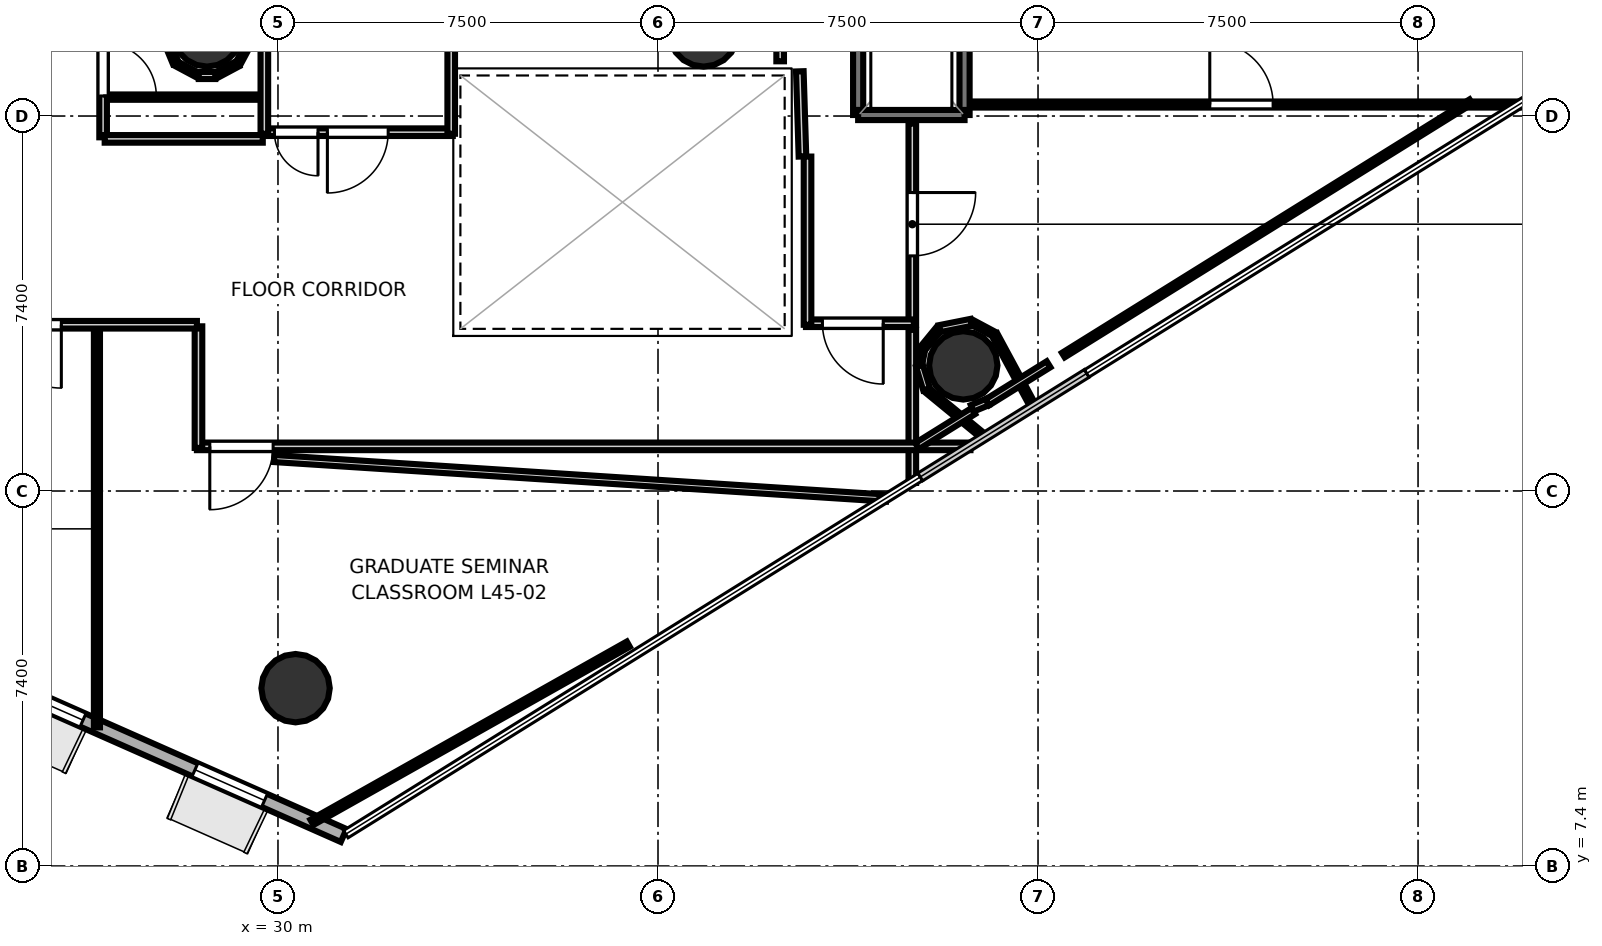
"""IFC4 building model, lengths in metres.
Left out: names, types, materials, properties, quantities, classifications, styles, units other than length and angle.
Written with IfcOpenShell. Run it as: python <this file> out.ifc"""

import sys

from ifc_helpers import new_model, si_unit, direction, frame, frame_2d, origin, origin_2d, place, context, subcontext, project, spatial, rectangle, hollow_circle, extrude, element, fill, save


model = new_model("IFC4")
c1 = context("Model", 3, precision=1e-05, world=origin(), true_north=direction((0.0, 1.0)))
c2 = subcontext(c1, "Body", "Model", "MODEL_VIEW")
j1 = project(units=[si_unit("LENGTHUNIT", "METRE"), si_unit("PLANEANGLEUNIT", "RADIAN")], contexts=[c1])
p1 = place(None, origin())
s1 = spatial("IfcSite", under=j1, at=p1, CompositionType="ELEMENT")
p2 = place(p1, origin())
s2 = spatial("IfcBuilding", under=s1, at=p2, CompositionType="ELEMENT")
p3 = place(p2, frame((0.0, 0.0, 177.2)))
s3 = spatial("IfcBuildingStorey", under=s2, at=p3, CompositionType="ELEMENT", Elevation=177.2)
for number, where, z_axis, x_axis in (
    (1, (28.6, 23.85, 0.0), (0.0, 0.0, 1.0), (1.0, 0.0, 0.0)),
    (2, (38.4, 23.85, 0.0), (0.0, 0.0, 1.0), (1.0, 0.0, 0.0)),
    (3, (30.347, 10.909, 0.0), (0.0, 0.0, 1.0), (1.0, 0.0, 0.0)),
    (4, (43.525, 17.279, 0.0), (0.0, 0.0, 1.0), (1.0, 0.0, 0.0)),
):
    element("IfcColumn", number, at=place(p3, frame(where, z_axis=z_axis, x_axis=x_axis)), inside=s3, PredefinedType="COLUMN", context=c2, shape_type="SweptSolid", body=[
        extrude(hollow_circle(Radius=0.675, WallThickness=0.032, at=origin_2d()), origin(), (0.0, 0.0, 1.0), 3.7),
    ])
p4 = place(p3, frame((23.803, 11.317, 0.0), z_axis=(0.0, 0.0, 1.0), x_axis=(0.914484878605, -0.404620077112, 0.0)))
e5 = element("IfcWall", 5, at=p4, inside=s3, PredefinedType="SOLIDWALL", context=c2, shape_type="SweptSolid", body=[
    extrude(rectangle(XDim=8.193, YDim=0.28, at=frame_2d((4.097, 0.0))), origin(), (0.0, 0.0, 1.0), 3.52),
])
p5 = place(p4, frame((1.068, 0.0, 0.85)))
e6 = element("IfcOpeningElement", 6, at=p5, cuts=e5, PredefinedType="OPENING", context=c2, shape_type="SweptSolid", body=[
    extrude(rectangle(XDim=1.5, YDim=2.1, at=frame_2d((0.75, 1.05))), frame((0.0, 0.15, 0.0), z_axis=(0.0, -1.0, 0.0), x_axis=(1.0, 0.0, 0.0)), (0.0, 0.0, 1.0), 0.3),
])
p6 = place(p4, frame((4.985, 0.0, 0.85)))
e7 = element("IfcOpeningElement", 7, at=p6, cuts=e5, PredefinedType="OPENING", context=c2, shape_type="SweptSolid", body=[
    extrude(rectangle(XDim=1.5, YDim=2.1, at=frame_2d((0.75, 1.05))), frame((0.0, 0.15, 0.0), z_axis=(0.0, -1.0, 0.0), x_axis=(1.0, 0.0, 0.0)), (0.0, 0.0, 1.0), 0.3),
])
for number, where, z_axis, x_axis in (
    (8, (43.55, 22.22, 0.0), (0.0, 0.0, 1.0), (0.0, 1.0, 0.0)),
    (9, (41.45, 22.22, 0.0), (0.0, 0.0, 1.0), (0.0, 1.0, 0.0)),
):
    element("IfcWall", number, at=place(p3, frame(where, z_axis=z_axis, x_axis=x_axis)), inside=s3, PredefinedType="SOLIDWALL", context=c2, shape_type="SweptSolid", body=[
        extrude(rectangle(XDim=2.36, YDim=0.2, at=frame_2d((1.18, 0.0))), origin(), (0.0, 0.0, 1.0), 3.52),
    ])
p7 = place(p3, frame((41.45, 22.22, 0.0), z_axis=(0.0, 0.0, 1.0), x_axis=(1.0, 0.0, 0.0)))
e10 = element("IfcWall", 10, at=p7, inside=s3, PredefinedType="SOLIDWALL", context=c2, shape_type="SweptSolid", body=[
    extrude(rectangle(XDim=2.1, YDim=0.2, at=frame_2d((1.05, 0.0))), origin(), (0.0, 0.0, 1.0), 3.52),
])
p8 = place(p3, frame((33.45, 21.881, 0.0), z_axis=(0.0, 0.0, 1.0), x_axis=(-1.0, 0.0, 0.0)))
e11 = element("IfcWall", 11, at=p8, inside=s3, PredefinedType="PARTITIONING", context=c2, shape_type="SweptSolid", body=[
    extrude(rectangle(XDim=3.75, YDim=0.15, at=frame_2d((1.875, 0.0))), origin(), (0.0, 0.0, 1.0), 2.84),
])
p9 = place(p8, frame((1.275, 0.0, 0.0)))
e12 = element("IfcOpeningElement", 12, at=p9, cuts=e11, PredefinedType="OPENING", context=c2, shape_type="SweptSolid", body=[
    extrude(rectangle(XDim=1.2, YDim=2.15, at=frame_2d((0.6, 1.075))), frame((0.0, 0.085, 0.0), z_axis=(0.0, -1.0, 0.0), x_axis=(1.0, 0.0, 0.0)), (0.0, 0.0, 1.0), 0.17),
])
p10 = place(p8, frame((2.66, 0.0, 0.0)))
e13 = element("IfcOpeningElement", 13, at=p10, cuts=e11, PredefinedType="OPENING", context=c2, shape_type="SweptSolid", body=[
    extrude(rectangle(XDim=0.86, YDim=2.05, at=frame_2d((0.43, 1.025))), frame((0.0, 0.085, 0.0), z_axis=(0.0, -1.0, 0.0), x_axis=(1.0, 0.0, 0.0)), (0.0, 0.0, 1.0), 0.17),
])
for number, where, z_axis, x_axis in (
    (14, (29.731, 21.85, 0.0), (0.0, 0.0, 1.0), (0.0, 1.0, 0.0)),
    (15, (33.419, 24.442, 0.0), (0.0, 0.0, 1.0), (0.0, -1.0, 0.0)),
):
    element("IfcWall", number, at=place(p3, frame(where, z_axis=z_axis, x_axis=x_axis)), inside=s3, PredefinedType="PARTITIONING", context=c2, shape_type="SweptSolid", body=[
        extrude(rectangle(XDim=2.592, YDim=0.15, at=frame_2d((1.296, 0.0))), origin(), (0.0, 0.0, 1.0), 2.84),
    ])
p11 = place(p3, frame((40.351, 21.401, 0.0), z_axis=(0.0, 0.0, 1.0), x_axis=(-0.031058045979, 0.999517582527, 0.0)))
e16 = element("IfcWall", 16, at=p11, inside=s3, PredefinedType="PARTITIONING", context=c2, shape_type="SweptSolid", body=[
    extrude(rectangle(XDim=1.682, YDim=0.15, at=frame_2d((0.841, 0.0))), origin(), (0.0, 0.0, 1.0), 2.84),
])
p12 = place(p3, frame((39.911, 23.28, 0.0), z_axis=(0.0, 0.0, 1.0), x_axis=(0.0, 1.0, 0.0)))
e17 = element("IfcWall", 17, at=p12, inside=s3, PredefinedType="PARTITIONING", context=c2, shape_type="SweptSolid", body=[
    extrude(rectangle(XDim=1.48, YDim=0.15, at=frame_2d((0.74, 0.0))), origin(), (0.0, 0.0, 1.0), 2.84),
])
p13 = place(p3, frame((42.519, 22.05, 0.0), z_axis=(0.0, 0.0, 1.0), x_axis=(0.0, -1.0, 0.0)))
e18 = element("IfcWall", 18, at=p13, inside=s3, PredefinedType="PARTITIONING", context=c2, shape_type="SweptSolid", body=[
    extrude(rectangle(XDim=3.97, YDim=0.15, at=frame_2d((1.985, 0.0))), origin(), (0.0, 0.0, 1.0), 2.84),
])
p14 = place(p13, frame((1.36, 0.0, 0.0)))
e19 = element("IfcOpeningElement", 19, at=p14, cuts=e18, PredefinedType="OPENING", context=c2, shape_type="SweptSolid", body=[
    extrude(rectangle(XDim=1.25, YDim=2.2, at=frame_2d((0.625, 1.1))), frame((0.0, 0.085, 0.0), z_axis=(0.0, -1.0, 0.0), x_axis=(1.0, 0.0, 0.0)), (0.0, 0.0, 1.0), 0.17),
])
p15 = place(p3, frame((42.55, 18.111, 0.0), z_axis=(0.0, 0.0, 1.0), x_axis=(-1.0, 0.0, 0.0)))
e20 = element("IfcWall", 20, at=p15, inside=s3, PredefinedType="PARTITIONING", context=c2, shape_type="SweptSolid", body=[
    extrude(rectangle(XDim=2.13, YDim=0.15, at=frame_2d((1.065, 0.0))), origin(), (0.0, 0.0, 1.0), 2.84),
])
p16 = place(p15, frame((0.605, 0.0, 0.0)))
e21 = element("IfcOpeningElement", 21, at=p16, cuts=e20, PredefinedType="OPENING", context=c2, shape_type="SweptSolid", body=[
    extrude(rectangle(XDim=1.2, YDim=2.15, at=frame_2d((0.6, 1.075))), frame((0.0, 0.085, 0.0), z_axis=(0.0, -1.0, 0.0), x_axis=(1.0, 0.0, 0.0)), (0.0, 0.0, 1.0), 0.17),
])
p17 = place(p3, frame((40.451, 18.08, 0.0), z_axis=(0.0, 0.0, 1.0), x_axis=(0.0, 1.0, 0.0)))
e22 = element("IfcWall", 22, at=p17, inside=s3, PredefinedType="PARTITIONING", context=c2, shape_type="SweptSolid", body=[
    extrude(rectangle(XDim=3.32, YDim=0.15, at=frame_2d((1.66, 0.0))), origin(), (0.0, 0.0, 1.0), 2.84),
])
p18 = place(p3, frame((26.549, 25.0, 0.0), z_axis=(0.0, 0.0, 1.0), x_axis=(0.0, -1.0, 0.0)))
e23 = element("IfcWall", 23, at=p18, inside=s3, PredefinedType="PARTITIONING", context=c2, shape_type="SweptSolid", body=[
    extrude(rectangle(XDim=3.22, YDim=0.15, at=frame_2d((1.61, 0.0))), origin(), (0.0, 0.0, 1.0), 2.84),
])
p19 = place(p18, frame((1.354, 0.0, 0.0)))
e24 = element("IfcOpeningElement", 24, at=p19, cuts=e23, PredefinedType="OPENING", context=c2, shape_type="SweptSolid", body=[
    extrude(rectangle(XDim=1.05, YDim=2.15, at=frame_2d((0.525, 1.075))), frame((0.0, 0.085, 0.0), z_axis=(0.0, -1.0, 0.0), x_axis=(1.0, 0.0, 0.0)), (0.0, 0.0, 1.0), 0.17),
])
p20 = place(p3, frame((26.58, 21.749, 0.0), z_axis=(0.0, 0.0, 1.0), x_axis=(1.0, 0.0, 0.0)))
e25 = element("IfcWall", 25, at=p20, inside=s3, PredefinedType="PARTITIONING", context=c2, shape_type="SweptSolid", body=[
    extrude(rectangle(XDim=3.12, YDim=0.15, at=frame_2d((1.56, 0.0))), origin(), (0.0, 0.0, 1.0), 2.84),
])
p21 = place(p3, frame((42.519, 17.98, 0.0), z_axis=(0.0, 0.0, 1.0), x_axis=(0.0, -1.0, 0.0)))
e26 = element("IfcWall", 26, at=p21, inside=s3, PredefinedType="PARTITIONING", context=c2, shape_type="SweptSolid", body=[
    extrude(rectangle(XDim=3.02, YDim=0.15, at=frame_2d((1.51, 0.0))), origin(), (0.0, 0.0, 1.0), 2.84),
])
p22 = place(p3, frame((43.666, 15.681, 0.0), z_axis=(0.0, 0.0, 1.0), x_axis=(-1.0, 0.0, 0.0)))
e27 = element("IfcWall", 27, at=p22, inside=s3, PredefinedType="PARTITIONING", context=c2, shape_type="SweptSolid", body=[
    extrude(rectangle(XDim=15.266, YDim=0.15, at=frame_2d((7.633, 0.0))), origin(), (0.0, 0.0, 1.0), 2.84),
])
p23 = place(p22, frame((13.762, 0.0, 0.0)))
e28 = element("IfcOpeningElement", 28, at=p23, cuts=e27, PredefinedType="OPENING", context=c2, shape_type="SweptSolid", body=[
    extrude(rectangle(XDim=1.25, YDim=2.2, at=frame_2d((0.625, 1.1))), frame((0.0, 0.085, 0.0), z_axis=(0.0, -1.0, 0.0), x_axis=(1.0, 0.0, 0.0)), (0.0, 0.0, 1.0), 0.17),
])
p24 = place(p3, frame((28.431, 15.65, 0.0), z_axis=(0.0, 0.0, 1.0), x_axis=(0.0, 1.0, 0.0)))
e29 = element("IfcWall", 29, at=p24, inside=s3, PredefinedType="PARTITIONING", context=c2, shape_type="SweptSolid", body=[
    extrude(rectangle(XDim=2.4, YDim=0.15, at=frame_2d((1.2, 0.0))), origin(), (0.0, 0.0, 1.0), 2.84),
])
p25 = place(p3, frame((28.4, 18.081, 0.0), z_axis=(0.0, 0.0, 1.0), x_axis=(-1.0, 0.0, 0.0)))
e30 = element("IfcWall", 30, at=p25, inside=s3, PredefinedType="PARTITIONING", context=c2, shape_type="SweptSolid", body=[
    extrude(rectangle(XDim=5.51, YDim=0.15, at=frame_2d((2.755, 0.0))), origin(), (0.0, 0.0, 1.0), 2.84),
])
p26 = place(p25, frame((2.676, 0.0, 0.0)))
e31 = element("IfcOpeningElement", 31, at=p26, cuts=e30, PredefinedType="OPENING", context=c2, shape_type="SweptSolid", body=[
    extrude(rectangle(XDim=1.25, YDim=2.2, at=frame_2d((0.625, 1.1))), frame((0.0, 0.085, 0.0), z_axis=(0.0, -1.0, 0.0), x_axis=(1.0, 0.0, 0.0)), (0.0, 0.0, 1.0), 0.17),
])
p27 = place(p3, frame((26.427, 17.97, 0.0), z_axis=(0.0, 0.0, 1.0), x_axis=(0.0, -1.0, 0.0)))
e32 = element("IfcWall", 32, at=p27, inside=s3, PredefinedType="PARTITIONING", context=c2, shape_type="SweptSolid", body=[
    extrude(rectangle(XDim=7.834, YDim=0.12, at=frame_2d((3.917, 0.0))), origin(), (0.0, 0.0, 1.0), 2.84),
])
p28 = place(p3, frame((29.924, 15.441, 0.0), z_axis=(0.0, 0.0, 1.0), x_axis=(0.997918113722, -0.064493707489, 0.0)))
e33 = element("IfcWall", 33, at=p28, inside=s3, PredefinedType="PARTITIONING", context=c2, shape_type="SweptSolid", body=[
    extrude(rectangle(XDim=12.106, YDim=0.14, at=frame_2d((6.053, 0.0))), origin(), (0.0, 0.0, 1.0), 2.84),
])
p29 = place(p3, frame((36.914, 11.778, 0.0), z_axis=(0.0, 0.0, 1.0), x_axis=(-0.87133707404, -0.490684932929, 0.0)))
e34 = element("IfcWall", 34, at=p29, inside=s3, PredefinedType="PARTITIONING", context=c2, shape_type="SweptSolid", body=[
    extrude(rectangle(XDim=7.167, YDim=0.12, at=frame_2d((3.583, 0.0))), origin(), (0.0, 0.0, 1.0), 2.84),
])
p30 = place(p3, frame((43.72, 22.427, 0.0), z_axis=(0.0, 0.0, 1.0), x_axis=(1.0, 0.0, 0.0)))
e35 = element("IfcWall", 35, at=p30, inside=s3, PredefinedType="PARTITIONING", context=c2, shape_type="SweptSolid", body=[
    extrude(rectangle(XDim=10.796, YDim=0.12, at=frame_2d((5.398, 0.0))), origin(), (0.0, 0.0, 1.0), 2.84),
])
p31 = place(p30, frame((4.67, 0.0, 0.0)))
e36 = element("IfcOpeningElement", 36, at=p31, cuts=e35, PredefinedType="OPENING", context=c2, shape_type="SweptSolid", body=[
    extrude(rectangle(XDim=1.25, YDim=2.2, at=frame_2d((0.625, 1.1))), frame((0.0, 0.07, 0.0), z_axis=(0.0, -1.0, 0.0), x_axis=(1.0, 0.0, 0.0)), (0.0, 0.0, 1.0), 0.14),
])
p32 = place(p3, frame((53.544, 22.484, 0.0), z_axis=(0.0, 0.0, 1.0), x_axis=(-0.849222240482, -0.528035591859, 0.0)))
e37 = element("IfcWall", 37, at=p32, inside=s3, PredefinedType="PARTITIONING", context=c2, shape_type="SweptSolid", body=[
    extrude(rectangle(XDim=9.474, YDim=0.105, at=frame_2d((4.737, 0.0))), origin(), (0.0, 0.0, 1.0), 2.84),
])
p33 = place(p3, frame((44.918, 16.448, 0.0), z_axis=(0.0, 0.0, 1.0), x_axis=(-0.475410648969, 0.879764010884, 0.0)))
e38 = element("IfcWall", 38, at=p33, inside=s3, PredefinedType="PARTITIONING", context=c2, shape_type="SweptSolid", body=[
    extrude(rectangle(XDim=1.632, YDim=0.12, at=frame_2d((0.816, 0.0))), origin(), (0.0, 0.0, 1.0), 2.84),
])
p34 = place(p3, frame((44.13, 17.897, 0.0), z_axis=(0.0, 0.0, 1.0), x_axis=(-0.88190639713, 0.471424550379, 0.0)))
e39 = element("IfcWall", 39, at=p34, inside=s3, PredefinedType="PARTITIONING", context=c2, shape_type="SweptSolid", body=[
    extrude(rectangle(XDim=0.485, YDim=0.105, at=frame_2d((0.242, 0.0))), origin(), (0.0, 0.0, 1.0), 2.84),
])
p35 = place(p3, frame((43.682, 18.128, 0.0), z_axis=(0.0, 0.0, 1.0), x_axis=(-0.98075661624, -0.195234371211, 0.0)))
e40 = element("IfcWall", 40, at=p35, inside=s3, PredefinedType="PARTITIONING", context=c2, shape_type="SweptSolid", body=[
    extrude(rectangle(XDim=0.639, YDim=0.14, at=frame_2d((0.319, 0.0))), origin(), (0.0, 0.0, 1.0), 2.84),
])
p36 = place(p3, frame((43.037, 17.993, 0.0), z_axis=(0.0, 0.0, 1.0), x_axis=(-0.634470928201, -0.772946726022, 0.0)))
e41 = element("IfcWall", 41, at=p36, inside=s3, PredefinedType="PARTITIONING", context=c2, shape_type="SweptSolid", body=[
    extrude(rectangle(XDim=0.485, YDim=0.12, at=frame_2d((0.242, 0.0))), origin(), (0.0, 0.0, 1.0), 2.84),
])
p37 = place(p3, frame((42.723, 17.604, 0.0), z_axis=(0.0, 0.0, 1.0), x_axis=(-0.194819090972, -0.980839192627, 0.0)))
e42 = element("IfcWall", 42, at=p37, inside=s3, PredefinedType="PARTITIONING", context=c2, shape_type="SweptSolid", body=[
    extrude(rectangle(XDim=0.326, YDim=0.105, at=frame_2d((0.163, 0.0))), origin(), (0.0, 0.0, 1.0), 2.84),
])
p38 = place(p3, frame((42.66, 17.27, 0.0), z_axis=(0.0, 0.0, 1.0), x_axis=(0.29011922788, -0.956990508633, 0.0)))
e43 = element("IfcWall", 43, at=p38, inside=s3, PredefinedType="PARTITIONING", context=c2, shape_type="SweptSolid", body=[
    extrude(rectangle(XDim=0.485, YDim=0.14, at=frame_2d((0.242, 0.0))), origin(), (0.0, 0.0, 1.0), 2.84),
])
p39 = place(p3, frame((42.811, 16.791, 0.0), z_axis=(0.0, 0.0, 1.0), x_axis=(0.773075442616, -0.634314086257, 0.0)))
e44 = element("IfcWall", 44, at=p39, inside=s3, PredefinedType="PARTITIONING", context=c2, shape_type="SweptSolid", body=[
    extrude(rectangle(XDim=1.481, YDim=0.12, at=frame_2d((0.741, 0.0))), origin(), (0.0, 0.0, 1.0), 2.84),
])
p40 = place(p3, frame((43.7, 16.431, 0.0), z_axis=(0.0, 0.0, 1.0), x_axis=(0.923806755208, 0.382859085086, 0.0)))
e45 = element("IfcWall", 45, at=p40, inside=s3, PredefinedType="PARTITIONING", context=c2, shape_type="SweptSolid", body=[
    extrude(rectangle(XDim=0.326, YDim=0.14, at=frame_2d((0.163, 0.0))), origin(), (0.0, 0.0, 1.0), 2.84),
])
p41 = place(p3, frame((45.208, 17.301, 0.0), z_axis=(0.0, 0.0, 1.0), x_axis=(-0.849251978106, -0.527987762816, 0.0)))
e46 = element("IfcWall", 46, at=p41, inside=s3, PredefinedType="PARTITIONING", context=c2, shape_type="SweptSolid", body=[
    extrude(rectangle(XDim=1.42, YDim=0.14, at=frame_2d((0.71, 0.0))), origin(), (0.0, 0.0, 1.0), 2.84),
])
p42 = place(p3, frame((43.722, 16.377, 0.0), z_axis=(0.0, 0.0, 1.0), x_axis=(-0.84923547493, -0.528014306738, 0.0)))
e47 = element("IfcWall", 47, at=p42, inside=s3, PredefinedType="PARTITIONING", context=c2, shape_type="SweptSolid", body=[
    extrude(rectangle(XDim=1.306, YDim=0.14, at=frame_2d((0.653, 0.0))), origin(), (0.0, 0.0, 1.0), 2.84),
])
p43 = place(p3, frame((27.736, 23.838, 0.0), z_axis=(0.0, 0.0, 1.0), x_axis=(0.382824178437, -0.923821221018, 0.0)))
e48 = element("IfcWall", 48, at=p43, inside=s3, PredefinedType="PARTITIONING", context=c2, shape_type="SweptSolid", body=[
    extrude(rectangle(XDim=0.639, YDim=0.12, at=frame_2d((0.319, 0.0))), origin(), (0.0, 0.0, 1.0), 2.84),
])
p44 = place(p3, frame((27.995, 23.232, 0.0), z_axis=(0.0, 0.0, 1.0), x_axis=(0.88190639713, -0.471424550379, 0.0)))
e49 = element("IfcWall", 49, at=p44, inside=s3, PredefinedType="PARTITIONING", context=c2, shape_type="SweptSolid", body=[
    extrude(rectangle(XDim=0.485, YDim=0.105, at=frame_2d((0.242, 0.0))), origin(), (0.0, 0.0, 1.0), 2.84),
])
p45 = place(p3, frame((28.437, 23.0, 0.0), z_axis=(0.0, 0.0, 1.0), x_axis=(1.0, 0.0, 0.0)))
e50 = element("IfcWall", 50, at=p45, inside=s3, PredefinedType="PARTITIONING", context=c2, shape_type="SweptSolid", body=[
    extrude(rectangle(XDim=0.326, YDim=0.14, at=frame_2d((0.163, 0.0))), origin(), (0.0, 0.0, 1.0), 2.84),
])
p46 = place(p3, frame((28.778, 23.004, 0.0), z_axis=(0.0, 0.0, 1.0), x_axis=(0.88190639713, 0.471424550379, 0.0)))
e51 = element("IfcWall", 51, at=p46, inside=s3, PredefinedType="PARTITIONING", context=c2, shape_type="SweptSolid", body=[
    extrude(rectangle(XDim=0.485, YDim=0.12, at=frame_2d((0.242, 0.0))), origin(), (0.0, 0.0, 1.0), 2.84),
])
p47 = place(p3, frame((29.218, 23.245, 0.0), z_axis=(0.0, 0.0, 1.0), x_axis=(0.471424550379, 0.88190639713, 0.0)))
e52 = element("IfcWall", 52, at=p47, inside=s3, PredefinedType="PARTITIONING", context=c2, shape_type="SweptSolid", body=[
    extrude(rectangle(XDim=0.485, YDim=0.105, at=frame_2d((0.242, 0.0))), origin(), (0.0, 0.0, 1.0), 2.84),
])
p48 = place(p3, frame((29.62, 22.573, 0.0), z_axis=(0.0, 0.0, 1.0), x_axis=(-1.0, 0.0, 0.0)))
e53 = element("IfcWall", 53, at=p48, inside=s3, PredefinedType="PARTITIONING", context=c2, shape_type="SweptSolid", body=[
    extrude(rectangle(XDim=2.96, YDim=0.105, at=frame_2d((1.48, 0.0))), origin(), (0.0, 0.0, 1.0), 2.84),
])
p49 = place(p9, origin())
e54 = element("IfcDoor", 54, at=p49, inside=s3, OperationType="SINGLE_SWING_RIGHT", PredefinedType="DOOR", context=c2, shape_type="SweptSolid", body=[
    extrude(rectangle(XDim=1.2, YDim=2.15, at=frame_2d((0.6, 1.075))), frame((0.0, 0.025, 0.0), z_axis=(0.0, -1.0, 0.0), x_axis=(1.0, 0.0, 0.0)), (0.0, 0.0, 1.0), 0.05),
])
fill(e12, e54)
p50 = place(p16, origin())
e55 = element("IfcDoor", 55, at=p50, inside=s3, OperationType="SINGLE_SWING_LEFT", PredefinedType="DOOR", context=c2, shape_type="SweptSolid", body=[
    extrude(rectangle(XDim=1.2, YDim=2.15, at=frame_2d((0.6, 1.075))), frame((0.0, 0.025, 0.0), z_axis=(0.0, -1.0, 0.0), x_axis=(1.0, 0.0, 0.0)), (0.0, 0.0, 1.0), 0.05),
])
fill(e21, e55)
p51 = place(p10, origin())
e56 = element("IfcDoor", 56, at=p51, inside=s3, OperationType="SINGLE_SWING_LEFT", PredefinedType="DOOR", context=c2, shape_type="SweptSolid", body=[
    extrude(rectangle(XDim=0.86, YDim=2.05, at=frame_2d((0.43, 1.025))), frame((0.0, 0.025, 0.0), z_axis=(0.0, -1.0, 0.0), x_axis=(1.0, 0.0, 0.0)), (0.0, 0.0, 1.0), 0.05),
])
fill(e13, e56)
p52 = place(p26, origin())
e57 = element("IfcDoor", 57, at=p52, inside=s3, OperationType="SINGLE_SWING_LEFT", PredefinedType="DOOR", context=c2, shape_type="SweptSolid", body=[
    extrude(rectangle(XDim=1.25, YDim=2.2, at=frame_2d((0.625, 1.1))), frame((0.0, 0.025, 0.0), z_axis=(0.0, -1.0, 0.0), x_axis=(1.0, 0.0, 0.0)), (0.0, 0.0, 1.0), 0.05),
])
fill(e31, e57)
p53 = place(p23, origin())
e58 = element("IfcDoor", 58, at=p53, inside=s3, OperationType="SINGLE_SWING_RIGHT", PredefinedType="DOOR", context=c2, shape_type="SweptSolid", body=[
    extrude(rectangle(XDim=1.25, YDim=2.2, at=frame_2d((0.625, 1.1))), frame((0.0, 0.025, 0.0), z_axis=(0.0, -1.0, 0.0), x_axis=(1.0, 0.0, 0.0)), (0.0, 0.0, 1.0), 0.05),
])
fill(e28, e58)
p54 = place(p14, origin())
e59 = element("IfcDoor", 59, at=p54, inside=s3, OperationType="SINGLE_SWING_LEFT", PredefinedType="DOOR", context=c2, shape_type="SweptSolid", body=[
    extrude(rectangle(XDim=1.25, YDim=2.2, at=frame_2d((0.625, 1.1))), frame((0.0, 0.025, 0.0), z_axis=(0.0, -1.0, 0.0), x_axis=(1.0, 0.0, 0.0)), (0.0, 0.0, 1.0), 0.05),
])
fill(e19, e59)
p55 = place(p19, origin())
e60 = element("IfcDoor", 60, at=p55, inside=s3, OperationType="SINGLE_SWING_RIGHT", PredefinedType="DOOR", context=c2, shape_type="SweptSolid", body=[
    extrude(rectangle(XDim=1.05, YDim=2.15, at=frame_2d((0.525, 1.075))), frame((0.0, 0.025, 0.0), z_axis=(0.0, -1.0, 0.0), x_axis=(1.0, 0.0, 0.0)), (0.0, 0.0, 1.0), 0.05),
])
fill(e24, e60)
p56 = place(p31, origin())
e61 = element("IfcDoor", 61, at=p56, inside=s3, OperationType="SINGLE_SWING_LEFT", PredefinedType="DOOR", context=c2, shape_type="SweptSolid", body=[
    extrude(rectangle(XDim=1.25, YDim=2.2, at=frame_2d((0.625, 1.1))), frame((0.0, 0.025, 0.0), z_axis=(0.0, -1.0, 0.0), x_axis=(1.0, 0.0, 0.0)), (0.0, 0.0, 1.0), 0.05),
])
fill(e36, e61)
p57 = place(p5, origin())
e62 = element("IfcWindow", 62, at=p57, inside=s3, PartitioningType="SINGLE_PANEL", PredefinedType="WINDOW", context=c2, shape_type="SweptSolid", body=[
    extrude(rectangle(XDim=1.5, YDim=2.1, at=frame_2d((0.75, 1.05))), frame((0.0, 0.03, 0.0), z_axis=(0.0, -1.0, 0.0), x_axis=(1.0, 0.0, 0.0)), (0.0, 0.0, 1.0), 0.06),
])
fill(e6, e62)
p58 = place(p6, origin())
e63 = element("IfcWindow", 63, at=p58, inside=s3, PartitioningType="SINGLE_PANEL", PredefinedType="WINDOW", context=c2, shape_type="SweptSolid", body=[
    extrude(rectangle(XDim=1.5, YDim=2.1, at=frame_2d((0.75, 1.05))), frame((0.0, 0.03, 0.0), z_axis=(0.0, -1.0, 0.0), x_axis=(1.0, 0.0, 0.0)), (0.0, 0.0, 1.0), 0.06),
])
fill(e7, e63)
save(model, sys.argv[1])
